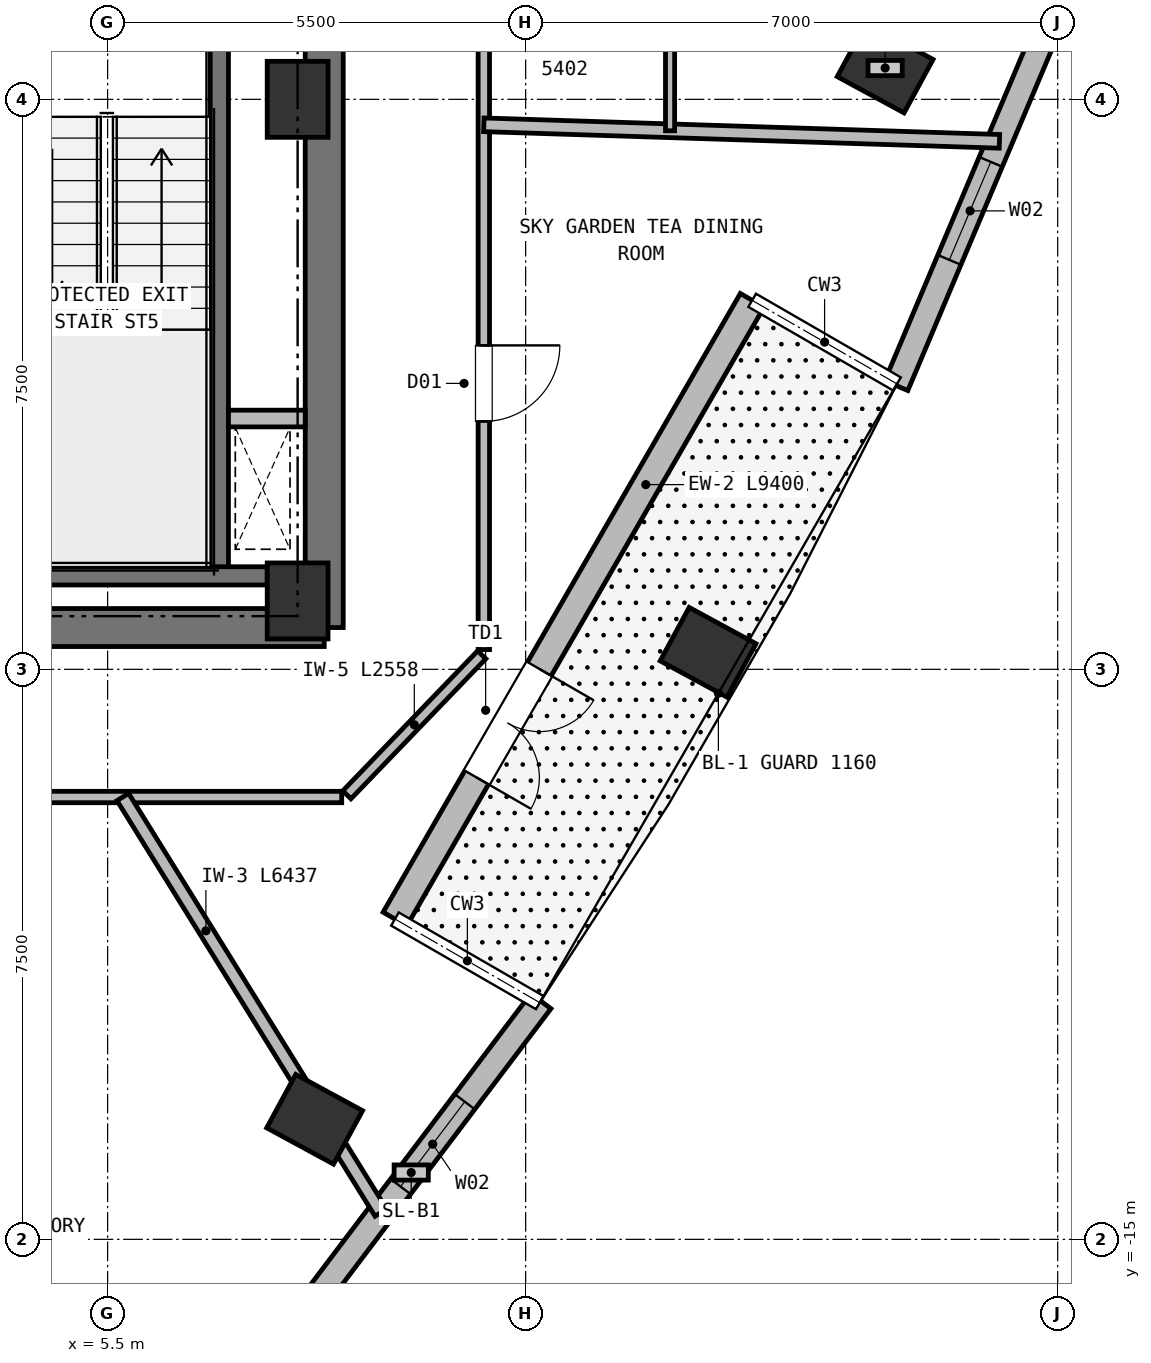
"""IFC4 building model, lengths in metres.
Left out: names, types, materials, properties, quantities, classifications, styles, units other than length and angle.
Written with IfcOpenShell. Run it as: python <this file> out.ifc"""

import sys

from ifc_helpers import new_model, si_unit, direction, frame, frame_2d, origin, origin_2d, place, context, subcontext, project, spatial, rectangle, extrude, element, fill, save


model = new_model("IFC4")
c1 = context("Model", 3, precision=1e-05, world=origin(), true_north=direction((0.0, 1.0)))
c2 = subcontext(c1, "Body", "Model", "MODEL_VIEW")
j1 = project(units=[si_unit("LENGTHUNIT", "METRE"), si_unit("PLANEANGLEUNIT", "RADIAN")], contexts=[c1])
p1 = place(None, origin())
s1 = spatial("IfcSite", under=j1, at=p1, CompositionType="ELEMENT")
p2 = place(p1, origin())
s2 = spatial("IfcBuilding", under=s1, at=p2, CompositionType="ELEMENT")
p3 = place(p2, frame((0.0, 0.0, 205.55)))
s3 = spatial("IfcBuildingStorey", under=s2, at=p3, CompositionType="ELEMENT", Elevation=205.55)
for number, where, z_axis, x_axis in (
    (1, (8.0, -6.6, 0.0), (0.0, 0.0, 1.0), (1.0, 0.0, 0.0)),
    (2, (8.0, 0.0, 0.0), (0.0, 0.0, 1.0), (1.0, 0.0, 0.0)),
):
    element("IfcColumn", number, at=place(p3, frame(where, z_axis=z_axis, x_axis=x_axis)), inside=s3, PredefinedType="COLUMN", context=c2, shape_type="SweptSolid", body=[
        extrude(rectangle(XDim=0.8, YDim=1.0, at=origin_2d()), origin(), (0.0, 0.0, 1.0), 3.8),
    ])
p4 = place(p3, frame((4.4, -6.95, 0.0), z_axis=(0.0, 0.0, 1.0), x_axis=(1.0, 0.0, 0.0)))
e3 = element("IfcWall", 3, at=p4, inside=s3, PredefinedType="SHEAR", context=c2, shape_type="SweptSolid", body=[
    extrude(rectangle(XDim=3.95, YDim=0.5, at=frame_2d((1.975, 0.0))), origin(), (0.0, 0.0, 1.0), 3.55),
])
p5 = place(p3, frame((8.35, -6.95, 0.0), z_axis=(0.0, 0.0, 1.0), x_axis=(0.0, 1.0, 0.0)))
e4 = element("IfcWall", 4, at=p5, inside=s3, PredefinedType="SHEAR", context=c2, shape_type="SweptSolid", body=[
    extrude(rectangle(XDim=8.1, YDim=0.5, at=frame_2d((4.05, 0.0))), origin(), (0.0, 0.0, 1.0), 3.55),
])
for number, where, z_axis, x_axis in (
    (5, (8.224, -13.42, 0.0), (0.0, 0.0, 1.0), (0.477, 0.879, 0.0)),
    (6, (13.4, -7.276, 0.0), (0.0, 0.0, 1.0), (0.477, 0.879, 0.0)),
    (7, (15.73, 0.412, 0.0), (0.0, 0.0, 1.0), (0.477, 0.879, 0.0)),
):
    element("IfcColumn", number, at=place(p3, frame(where, z_axis=z_axis, x_axis=x_axis)), inside=s3, PredefinedType="COLUMN", context=c2, shape_type="SweptSolid", body=[
        extrude(rectangle(XDim=0.8, YDim=1.0, at=origin_2d()), origin(), (0.0, 0.0, 1.0), 3.8),
    ])
p6 = place(p3, frame((13.981, -2.645, 0.0), z_axis=(0.0, 0.0, 1.0), x_axis=(-0.500004972392, -0.866022532953, 0.0)))
e8 = element("IfcWall", 8, at=p6, inside=s3, PredefinedType="SOLIDWALL", context=c2, shape_type="SweptSolid", body=[
    extrude(rectangle(XDim=9.4, YDim=0.36, at=frame_2d((4.7, 0.0))), origin(), (0.0, 0.0, 1.0), 3.23),
])
p7 = place(p6, frame((5.6, 0.0, 0.0)))
e9 = element("IfcOpeningElement", 9, at=p7, cuts=e8, PredefinedType="OPENING", context=c2, shape_type="SweptSolid", body=[
    extrude(rectangle(XDim=1.65, YDim=2.25, at=frame_2d((0.825, 1.125))), frame((0.0, 0.19, 0.0), z_axis=(0.0, -1.0, 0.0), x_axis=(1.0, 0.0, 0.0)), (0.0, 0.0, 1.0), 0.38),
])
p8 = place(p3, frame((11.201, -11.865, 0.0), z_axis=(0.0, 0.0, 1.0), x_axis=(-0.603392230828, -0.797444553418, 0.0)))
e10 = element("IfcWall", 10, at=p8, inside=s3, PredefinedType="SOLIDWALL", context=c2, shape_type="SweptSolid", body=[
    extrude(rectangle(XDim=5.656, YDim=0.33, at=frame_2d((2.828, 0.0))), origin(), (0.0, 0.0, 1.0), 3.55),
])
p9 = place(p8, frame((1.66, 0.0, 0.72)))
e11 = element("IfcOpeningElement", 11, at=p9, cuts=e10, PredefinedType="OPENING", context=c2, shape_type="SweptSolid", body=[
    extrude(rectangle(XDim=1.4, YDim=1.88, at=frame_2d((0.7, 0.94))), frame((0.0, 0.175, 0.0), z_axis=(0.0, -1.0, 0.0), x_axis=(1.0, 0.0, 0.0)), (0.0, 0.0, 1.0), 0.35),
])
p10 = place(p3, frame((18.076, 1.444, 0.0), z_axis=(0.0, 0.0, 1.0), x_axis=(-0.388886562254, -0.921285646094, 0.0)))
e12 = element("IfcWall", 12, at=p10, inside=s3, PredefinedType="SOLIDWALL", context=c2, shape_type="SweptSolid", body=[
    extrude(rectangle(XDim=5.656, YDim=0.33, at=frame_2d((2.828, 0.0))), origin(), (0.0, 0.0, 1.0), 3.55),
])
p11 = place(p10, frame((2.46, 0.0, 0.72)))
e13 = element("IfcOpeningElement", 13, at=p11, cuts=e12, PredefinedType="OPENING", context=c2, shape_type="SweptSolid", body=[
    extrude(rectangle(XDim=1.4, YDim=1.88, at=frame_2d((0.7, 0.94))), frame((0.0, 0.175, 0.0), z_axis=(0.0, -1.0, 0.0), x_axis=(1.0, 0.0, 0.0)), (0.0, 0.0, 1.0), 0.35),
])
p12 = place(p3, frame((6.97, -6.16, 0.0), z_axis=(0.0, 0.0, 1.0), x_axis=(0.0, 1.0, 0.0)))
e14 = element("IfcWall", 14, at=p12, inside=s3, PredefinedType="SHEAR", context=c2, shape_type="SweptSolid", body=[
    extrude(rectangle(XDim=7.22, YDim=0.24, at=frame_2d((3.61, 0.0))), origin(), (0.0, 0.0, 1.0), 3.55),
])
p13 = place(p3, frame((4.01, -6.27, 0.0), z_axis=(0.0, 0.0, 1.0), x_axis=(1.0, 0.0, 0.0)))
e15 = element("IfcWall", 15, at=p13, inside=s3, PredefinedType="SHEAR", context=c2, shape_type="SweptSolid", body=[
    extrude(rectangle(XDim=3.59, YDim=0.24, at=frame_2d((1.795, 0.0))), origin(), (0.0, 0.0, 1.0), 3.55),
])
p14 = place(p3, frame((7.09, -4.2, 0.0), z_axis=(0.0, 0.0, 1.0), x_axis=(1.0, 0.0, 0.0)))
e16 = element("IfcWall", 16, at=p14, inside=s3, PredefinedType="PARTITIONING", context=c2, shape_type="SweptSolid", body=[
    extrude(rectangle(XDim=1.01, YDim=0.22, at=frame_2d((0.505, 0.0))), origin(), (0.0, 0.0, 1.0), 3.55),
])
p15 = place(p3, frame((8.58, -9.18, 0.0), z_axis=(0.0, 0.0, 1.0), x_axis=(-1.0, 0.0, 0.0)))
e17 = element("IfcWall", 17, at=p15, inside=s3, PredefinedType="PARTITIONING", context=c2, shape_type="SweptSolid", body=[
    extrude(rectangle(XDim=17.16, YDim=0.15, at=frame_2d((8.58, 0.0))), origin(), (0.0, 0.0, 1.0), 3.23),
])
p16 = place(p15, frame((10.928, 0.0, 0.0)))
e18 = element("IfcOpeningElement", 18, at=p16, cuts=e17, PredefinedType="OPENING", context=c2, shape_type="SweptSolid", body=[
    extrude(rectangle(XDim=0.95, YDim=2.1, at=frame_2d((0.475, 1.05))), frame((0.0, 0.085, 0.0), z_axis=(0.0, -1.0, 0.0), x_axis=(1.0, 0.0, 0.0)), (0.0, 0.0, 1.0), 0.17),
])
p17 = place(p15, frame((13.549, 0.0, 0.0)))
e19 = element("IfcOpeningElement", 19, at=p17, cuts=e17, PredefinedType="OPENING", context=c2, shape_type="SweptSolid", body=[
    extrude(rectangle(XDim=1.0, YDim=2.15, at=frame_2d((0.5, 1.075))), frame((0.0, 0.085, 0.0), z_axis=(0.0, -1.0, 0.0), x_axis=(1.0, 0.0, 0.0)), (0.0, 0.0, 1.0), 0.17),
])
p18 = place(p15, frame((4.479, 0.0, 0.0)))
e20 = element("IfcOpeningElement", 20, at=p18, cuts=e17, PredefinedType="OPENING", context=c2, shape_type="SweptSolid", body=[
    extrude(rectangle(XDim=1.06, YDim=2.15, at=frame_2d((0.53, 1.075))), frame((0.0, 0.085, 0.0), z_axis=(0.0, -1.0, 0.0), x_axis=(1.0, 0.0, 0.0)), (0.0, 0.0, 1.0), 0.17),
])
p19 = place(p3, frame((10.422, -7.309, 0.0), z_axis=(0.0, 0.0, 1.0), x_axis=(-0.693764562202, -0.720201869085, 0.0)))
e21 = element("IfcWall", 21, at=p19, inside=s3, PredefinedType="PARTITIONING", context=c2, shape_type="SweptSolid", body=[
    extrude(rectangle(XDim=2.558, YDim=0.15, at=frame_2d((1.279, 0.0))), origin(), (0.0, 0.0, 1.0), 3.23),
])
p20 = place(p3, frame((10.45, 7.24, 0.0), z_axis=(0.0, 0.0, 1.0), x_axis=(0.0, -1.0, 0.0)))
e22 = element("IfcWall", 22, at=p20, inside=s3, PredefinedType="PARTITIONING", context=c2, shape_type="SweptSolid", body=[
    extrude(rectangle(XDim=14.48, YDim=0.15, at=frame_2d((7.24, 0.0))), origin(), (0.0, 0.0, 1.0), 3.55),
])
p21 = place(p20, frame((10.478, 0.0, 0.0)))
e23 = element("IfcOpeningElement", 23, at=p21, cuts=e22, PredefinedType="OPENING", context=c2, shape_type="SweptSolid", body=[
    extrude(rectangle(XDim=1.0, YDim=2.15, at=frame_2d((0.5, 1.075))), frame((0.0, 0.085, 0.0), z_axis=(0.0, -1.0, 0.0), x_axis=(1.0, 0.0, 0.0)), (0.0, 0.0, 1.0), 0.17),
])
p22 = place(p20, frame((1.57, 0.0, 0.0)))
e24 = element("IfcOpeningElement", 24, at=p22, cuts=e22, PredefinedType="OPENING", context=c2, shape_type="SweptSolid", body=[
    extrude(rectangle(XDim=1.06, YDim=2.15, at=frame_2d((0.53, 1.075))), frame((0.0, 0.085, 0.0), z_axis=(0.0, -1.0, 0.0), x_axis=(1.0, 0.0, 0.0)), (0.0, 0.0, 1.0), 0.17),
])
p23 = place(p3, frame((5.7, -9.18, 0.0), z_axis=(0.0, 0.0, 1.0), x_axis=(0.527494096937, -0.849558695851, 0.0)))
e25 = element("IfcWall", 25, at=p23, inside=s3, PredefinedType="PARTITIONING", context=c2, shape_type="SweptSolid", body=[
    extrude(rectangle(XDim=6.437, YDim=0.18, at=frame_2d((3.218, 0.0))), origin(), (0.0, 0.0, 1.0), 3.55),
])
p24 = place(p3, frame((10.45, -0.335, 0.0), z_axis=(0.0, 0.0, 1.0), x_axis=(0.99948738044, -0.032015251704, 0.0)))
e26 = element("IfcWall", 26, at=p24, inside=s3, PredefinedType="PARTITIONING", context=c2, shape_type="SweptSolid", body=[
    extrude(rectangle(XDim=6.787, YDim=0.18, at=frame_2d((3.394, 0.0))), origin(), (0.0, 0.0, 1.0), 3.55),
])
p25 = place(p3, frame((12.9, 4.097, 0.0), z_axis=(0.0, 0.0, 1.0), x_axis=(0.0, -1.0, 0.0)))
e27 = element("IfcWall", 27, at=p25, inside=s3, PredefinedType="PARTITIONING", context=c2, shape_type="SweptSolid", body=[
    extrude(rectangle(XDim=4.511, YDim=0.12, at=frame_2d((2.256, 0.0))), origin(), (0.0, 0.0, 1.0), 3.55),
])
p26 = place(p25, frame((1.796, 0.0, 0.0)))
e28 = element("IfcOpeningElement", 28, at=p26, cuts=e27, PredefinedType="OPENING", context=c2, shape_type="SweptSolid", body=[
    extrude(rectangle(XDim=0.92, YDim=2.1, at=frame_2d((0.46, 1.05))), frame((0.0, 0.07, 0.0), z_axis=(0.0, -1.0, 0.0), x_axis=(1.0, 0.0, 0.0)), (0.0, 0.0, 1.0), 0.14),
])
p27 = place(p7, origin())
e29 = element("IfcDoor", 29, at=p27, inside=s3, OperationType="DOUBLE_DOOR_SINGLE_SWING", PredefinedType="DOOR", context=c2, shape_type="SweptSolid", body=[
    extrude(rectangle(XDim=1.65, YDim=2.25, at=frame_2d((0.825, 1.125))), frame((0.0, 0.025, 0.0), z_axis=(0.0, -1.0, 0.0), x_axis=(1.0, 0.0, 0.0)), (0.0, 0.0, 1.0), 0.05),
])
fill(e9, e29)
p28 = place(p9, origin())
e30 = element("IfcWindow", 30, at=p28, inside=s3, PartitioningType="SINGLE_PANEL", PredefinedType="WINDOW", context=c2, shape_type="SweptSolid", body=[
    extrude(rectangle(XDim=1.4, YDim=1.88, at=frame_2d((0.7, 0.94))), frame((0.0, 0.03, 0.0), z_axis=(0.0, -1.0, 0.0), x_axis=(1.0, 0.0, 0.0)), (0.0, 0.0, 1.0), 0.06),
])
fill(e11, e30)
p29 = place(p11, origin())
e31 = element("IfcWindow", 31, at=p29, inside=s3, PartitioningType="SINGLE_PANEL", PredefinedType="WINDOW", context=c2, shape_type="SweptSolid", body=[
    extrude(rectangle(XDim=1.4, YDim=1.88, at=frame_2d((0.7, 0.94))), frame((0.0, 0.03, 0.0), z_axis=(0.0, -1.0, 0.0), x_axis=(1.0, 0.0, 0.0)), (0.0, 0.0, 1.0), 0.06),
])
fill(e13, e31)
p30 = place(p21, origin())
e32 = element("IfcDoor", 32, at=p30, inside=s3, OperationType="SINGLE_SWING_LEFT", PredefinedType="DOOR", context=c2, shape_type="SweptSolid", body=[
    extrude(rectangle(XDim=1.0, YDim=2.15, at=frame_2d((0.5, 1.075))), frame((0.0, 0.025, 0.0), z_axis=(0.0, -1.0, 0.0), x_axis=(1.0, 0.0, 0.0)), (0.0, 0.0, 1.0), 0.05),
])
fill(e23, e32)
save(model, sys.argv[1])
